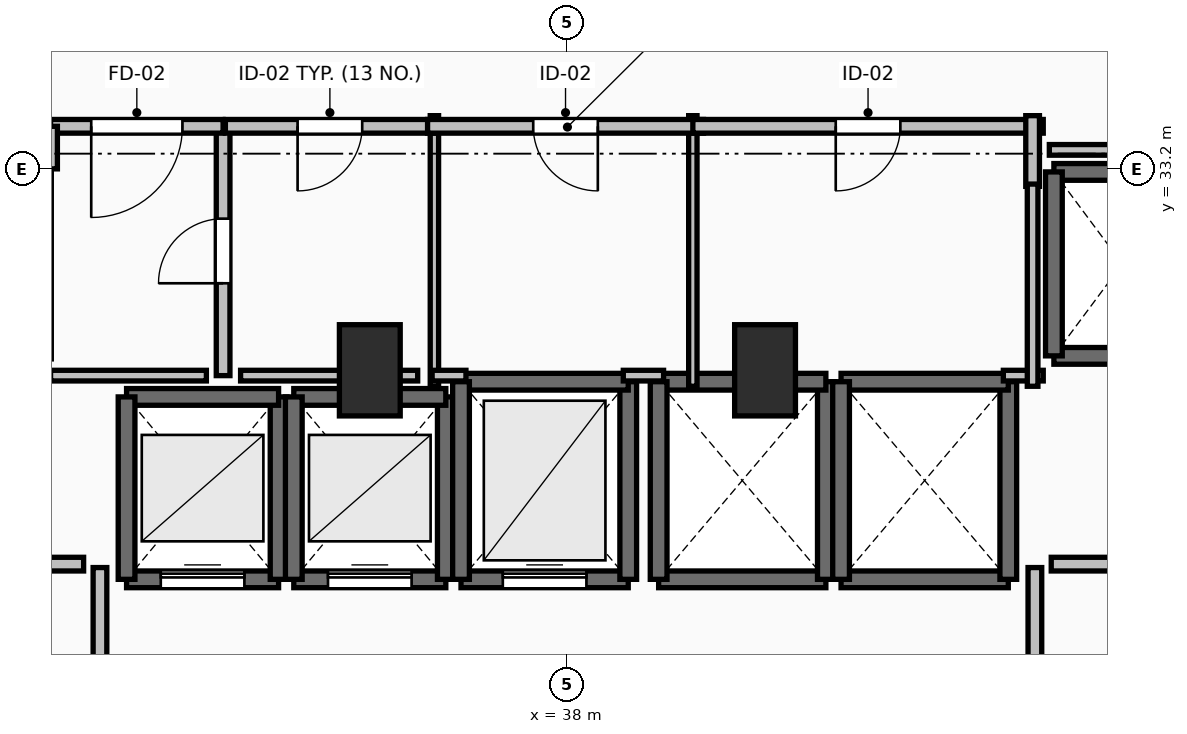
"""IFC4 building model, lengths in metres.
Left out: names, types, materials, properties, quantities, classifications, styles, units other than length and angle.
Written with IfcOpenShell. Run it as: python <this file> out.ifc"""

import sys

from ifc_helpers import new_model, si_unit, direction, frame, frame_2d, origin, origin_2d, place, context, subcontext, project, spatial, rectangle, extrude, element, fill, save


model = new_model("IFC4")
c1 = context("Model", 3, precision=1e-05, world=origin(), true_north=direction((0.0, 1.0)))
c2 = subcontext(c1, "Body", "Model", "MODEL_VIEW")
j1 = project(units=[si_unit("LENGTHUNIT", "METRE"), si_unit("PLANEANGLEUNIT", "RADIAN")], contexts=[c1])
p1 = place(None, origin())
s1 = spatial("IfcSite", under=j1, at=p1, CompositionType="ELEMENT")
p2 = place(p1, origin())
s2 = spatial("IfcBuilding", under=s1, at=p2, CompositionType="ELEMENT")
p3 = place(p2, frame((0.0, 0.0, 78.8)))
s3 = spatial("IfcBuildingStorey", under=s2, at=p3, CompositionType="ELEMENT", Elevation=78.8)
for number, where, z_axis, x_axis in (
    (1, (35.4, 30.55, 0.0), (0.0, 0.0, 1.0), (1.0, 0.0, 0.0)),
    (2, (40.6, 30.55, 0.0), (0.0, 0.0, 1.0), (1.0, 0.0, 0.0)),
):
    element("IfcColumn", number, at=place(p3, frame(where, z_axis=z_axis, x_axis=x_axis)), inside=s3, PredefinedType="PILASTER", context=c2, shape_type="SweptSolid", body=[
        extrude(rectangle(XDim=0.8, YDim=1.2, at=origin_2d()), origin(), (0.0, 0.0, 1.0), 3.5),
    ])
p4 = place(p3, frame((32.2, 27.8, 0.0), z_axis=(0.0, 0.0, 1.0), x_axis=(1.0, 0.0, 0.0)))
e3 = element("IfcWall", 3, at=p4, inside=s3, PredefinedType="SOLIDWALL", context=c2, shape_type="SweptSolid", body=[
    extrude(rectangle(XDim=2.0, YDim=0.22, at=frame_2d((1.0, 0.0))), origin(), (0.0, 0.0, 1.0), 3.24),
])
p5 = place(p4, frame((0.45, 0.0, 0.0)))
e4 = element("IfcOpeningElement", 4, at=p5, cuts=e3, PredefinedType="OPENING", context=c2, shape_type="SweptSolid", body=[
    extrude(rectangle(XDim=1.1, YDim=2.2, at=frame_2d((0.55, 1.1))), frame((0.0, 0.125, 0.0), z_axis=(0.0, -1.0, 0.0), x_axis=(1.0, 0.0, 0.0)), (0.0, 0.0, 1.0), 0.25),
])
p6 = place(p3, frame((34.2, 27.8, 0.0), z_axis=(0.0, 0.0, 1.0), x_axis=(0.0, 1.0, 0.0)))
e5 = element("IfcWall", 5, at=p6, inside=s3, PredefinedType="SOLIDWALL", context=c2, shape_type="SweptSolid", body=[
    extrude(rectangle(XDim=2.4, YDim=0.22, at=frame_2d((1.2, 0.0))), origin(), (0.0, 0.0, 1.0), 3.24),
])
p7 = place(p3, frame((34.2, 30.2, 0.0), z_axis=(0.0, 0.0, 1.0), x_axis=(-1.0, 0.0, 0.0)))
e6 = element("IfcWall", 6, at=p7, inside=s3, PredefinedType="SOLIDWALL", context=c2, shape_type="SweptSolid", body=[
    extrude(rectangle(XDim=2.0, YDim=0.22, at=frame_2d((1.0, 0.0))), origin(), (0.0, 0.0, 1.0), 3.24),
])
p8 = place(p3, frame((32.2, 30.2, 0.0), z_axis=(0.0, 0.0, 1.0), x_axis=(0.0, -1.0, 0.0)))
e7 = element("IfcWall", 7, at=p8, inside=s3, PredefinedType="SOLIDWALL", context=c2, shape_type="SweptSolid", body=[
    extrude(rectangle(XDim=2.4, YDim=0.22, at=frame_2d((1.2, 0.0))), origin(), (0.0, 0.0, 1.0), 3.24),
])
p9 = place(p3, frame((34.4, 27.8, 0.0), z_axis=(0.0, 0.0, 1.0), x_axis=(1.0, 0.0, 0.0)))
e8 = element("IfcWall", 8, at=p9, inside=s3, PredefinedType="SOLIDWALL", context=c2, shape_type="SweptSolid", body=[
    extrude(rectangle(XDim=2.0, YDim=0.22, at=frame_2d((1.0, 0.0))), origin(), (0.0, 0.0, 1.0), 3.24),
])
p10 = place(p9, frame((0.45, 0.0, 0.0)))
e9 = element("IfcOpeningElement", 9, at=p10, cuts=e8, PredefinedType="OPENING", context=c2, shape_type="SweptSolid", body=[
    extrude(rectangle(XDim=1.1, YDim=2.2, at=frame_2d((0.55, 1.1))), frame((0.0, 0.125, 0.0), z_axis=(0.0, -1.0, 0.0), x_axis=(1.0, 0.0, 0.0)), (0.0, 0.0, 1.0), 0.25),
])
p11 = place(p3, frame((36.4, 27.8, 0.0), z_axis=(0.0, 0.0, 1.0), x_axis=(0.0, 1.0, 0.0)))
e10 = element("IfcWall", 10, at=p11, inside=s3, PredefinedType="SOLIDWALL", context=c2, shape_type="SweptSolid", body=[
    extrude(rectangle(XDim=2.4, YDim=0.22, at=frame_2d((1.2, 0.0))), origin(), (0.0, 0.0, 1.0), 3.24),
])
p12 = place(p3, frame((36.4, 30.2, 0.0), z_axis=(0.0, 0.0, 1.0), x_axis=(-1.0, 0.0, 0.0)))
e11 = element("IfcWall", 11, at=p12, inside=s3, PredefinedType="SOLIDWALL", context=c2, shape_type="SweptSolid", body=[
    extrude(rectangle(XDim=2.0, YDim=0.22, at=frame_2d((1.0, 0.0))), origin(), (0.0, 0.0, 1.0), 3.24),
])
p13 = place(p3, frame((34.4, 30.2, 0.0), z_axis=(0.0, 0.0, 1.0), x_axis=(0.0, -1.0, 0.0)))
e12 = element("IfcWall", 12, at=p13, inside=s3, PredefinedType="SOLIDWALL", context=c2, shape_type="SweptSolid", body=[
    extrude(rectangle(XDim=2.4, YDim=0.22, at=frame_2d((1.2, 0.0))), origin(), (0.0, 0.0, 1.0), 3.24),
])
p14 = place(p3, frame((36.6, 27.8, 0.0), z_axis=(0.0, 0.0, 1.0), x_axis=(1.0, 0.0, 0.0)))
e13 = element("IfcWall", 13, at=p14, inside=s3, PredefinedType="SOLIDWALL", context=c2, shape_type="SweptSolid", body=[
    extrude(rectangle(XDim=2.2, YDim=0.22, at=frame_2d((1.1, 0.0))), origin(), (0.0, 0.0, 1.0), 3.24),
])
p15 = place(p14, frame((0.55, 0.0, 0.0)))
e14 = element("IfcOpeningElement", 14, at=p15, cuts=e13, PredefinedType="OPENING", context=c2, shape_type="SweptSolid", body=[
    extrude(rectangle(XDim=1.1, YDim=2.2, at=frame_2d((0.55, 1.1))), frame((0.0, 0.125, 0.0), z_axis=(0.0, -1.0, 0.0), x_axis=(1.0, 0.0, 0.0)), (0.0, 0.0, 1.0), 0.25),
])
p16 = place(p3, frame((38.8, 27.8, 0.0), z_axis=(0.0, 0.0, 1.0), x_axis=(0.0, 1.0, 0.0)))
e15 = element("IfcWall", 15, at=p16, inside=s3, PredefinedType="SOLIDWALL", context=c2, shape_type="SweptSolid", body=[
    extrude(rectangle(XDim=2.6, YDim=0.22, at=frame_2d((1.3, 0.0))), origin(), (0.0, 0.0, 1.0), 3.24),
])
p17 = place(p3, frame((38.8, 30.4, 0.0), z_axis=(0.0, 0.0, 1.0), x_axis=(-1.0, 0.0, 0.0)))
e16 = element("IfcWall", 16, at=p17, inside=s3, PredefinedType="SOLIDWALL", context=c2, shape_type="SweptSolid", body=[
    extrude(rectangle(XDim=2.2, YDim=0.22, at=frame_2d((1.1, 0.0))), origin(), (0.0, 0.0, 1.0), 3.24),
])
p18 = place(p3, frame((36.6, 30.4, 0.0), z_axis=(0.0, 0.0, 1.0), x_axis=(0.0, -1.0, 0.0)))
e17 = element("IfcWall", 17, at=p18, inside=s3, PredefinedType="SOLIDWALL", context=c2, shape_type="SweptSolid", body=[
    extrude(rectangle(XDim=2.6, YDim=0.22, at=frame_2d((1.3, 0.0))), origin(), (0.0, 0.0, 1.0), 3.24),
])
p19 = place(p3, frame((39.2, 27.8, 0.0), z_axis=(0.0, 0.0, 1.0), x_axis=(1.0, 0.0, 0.0)))
e18 = element("IfcWall", 18, at=p19, inside=s3, PredefinedType="SOLIDWALL", context=c2, shape_type="SweptSolid", body=[
    extrude(rectangle(XDim=2.2, YDim=0.22, at=frame_2d((1.1, 0.0))), origin(), (0.0, 0.0, 1.0), 3.24),
])
p20 = place(p3, frame((41.4, 27.8, 0.0), z_axis=(0.0, 0.0, 1.0), x_axis=(0.0, 1.0, 0.0)))
e19 = element("IfcWall", 19, at=p20, inside=s3, PredefinedType="SOLIDWALL", context=c2, shape_type="SweptSolid", body=[
    extrude(rectangle(XDim=2.6, YDim=0.22, at=frame_2d((1.3, 0.0))), origin(), (0.0, 0.0, 1.0), 3.24),
])
p21 = place(p3, frame((41.4, 30.4, 0.0), z_axis=(0.0, 0.0, 1.0), x_axis=(-1.0, 0.0, 0.0)))
e20 = element("IfcWall", 20, at=p21, inside=s3, PredefinedType="SOLIDWALL", context=c2, shape_type="SweptSolid", body=[
    extrude(rectangle(XDim=2.2, YDim=0.22, at=frame_2d((1.1, 0.0))), origin(), (0.0, 0.0, 1.0), 3.24),
])
p22 = place(p3, frame((39.2, 30.4, 0.0), z_axis=(0.0, 0.0, 1.0), x_axis=(0.0, -1.0, 0.0)))
e21 = element("IfcWall", 21, at=p22, inside=s3, PredefinedType="SOLIDWALL", context=c2, shape_type="SweptSolid", body=[
    extrude(rectangle(XDim=2.6, YDim=0.22, at=frame_2d((1.3, 0.0))), origin(), (0.0, 0.0, 1.0), 3.24),
])
p23 = place(p3, frame((41.6, 27.8, 0.0), z_axis=(0.0, 0.0, 1.0), x_axis=(1.0, 0.0, 0.0)))
e22 = element("IfcWall", 22, at=p23, inside=s3, PredefinedType="SOLIDWALL", context=c2, shape_type="SweptSolid", body=[
    extrude(rectangle(XDim=2.2, YDim=0.22, at=frame_2d((1.1, 0.0))), origin(), (0.0, 0.0, 1.0), 3.24),
])
p24 = place(p3, frame((43.8, 27.8, 0.0), z_axis=(0.0, 0.0, 1.0), x_axis=(0.0, 1.0, 0.0)))
e23 = element("IfcWall", 23, at=p24, inside=s3, PredefinedType="SOLIDWALL", context=c2, shape_type="SweptSolid", body=[
    extrude(rectangle(XDim=2.6, YDim=0.22, at=frame_2d((1.3, 0.0))), origin(), (0.0, 0.0, 1.0), 3.24),
])
p25 = place(p3, frame((43.8, 30.4, 0.0), z_axis=(0.0, 0.0, 1.0), x_axis=(-1.0, 0.0, 0.0)))
e24 = element("IfcWall", 24, at=p25, inside=s3, PredefinedType="SOLIDWALL", context=c2, shape_type="SweptSolid", body=[
    extrude(rectangle(XDim=2.2, YDim=0.22, at=frame_2d((1.1, 0.0))), origin(), (0.0, 0.0, 1.0), 3.24),
])
p26 = place(p3, frame((41.6, 30.4, 0.0), z_axis=(0.0, 0.0, 1.0), x_axis=(0.0, -1.0, 0.0)))
e25 = element("IfcWall", 25, at=p26, inside=s3, PredefinedType="SOLIDWALL", context=c2, shape_type="SweptSolid", body=[
    extrude(rectangle(XDim=2.6, YDim=0.22, at=frame_2d((1.3, 0.0))), origin(), (0.0, 0.0, 1.0), 3.24),
])
for number, where, z_axis, x_axis in (
    (26, (44.4, 30.74, 0.0), (0.0, 0.0, 1.0), (1.0, 0.0, 0.0)),
    (27, (46.2, 33.16, 0.0), (0.0, 0.0, 1.0), (-1.0, 0.0, 0.0)),
):
    element("IfcWall", number, at=place(p3, frame(where, z_axis=z_axis, x_axis=x_axis)), inside=s3, PredefinedType="SOLIDWALL", context=c2, shape_type="SweptSolid", body=[
        extrude(rectangle(XDim=1.8, YDim=0.22, at=frame_2d((0.9, 0.0))), origin(), (0.0, 0.0, 1.0), 3.24),
    ])
p27 = place(p3, frame((44.4, 33.16, 0.0), z_axis=(0.0, 0.0, 1.0), x_axis=(0.0, -1.0, 0.0)))
e28 = element("IfcWall", 28, at=p27, inside=s3, PredefinedType="SOLIDWALL", context=c2, shape_type="SweptSolid", body=[
    extrude(rectangle(XDim=2.42, YDim=0.22, at=frame_2d((1.21, 0.0))), origin(), (0.0, 0.0, 1.0), 3.24),
])
p28 = place(p3, frame((31.85, 24.045, 0.0), z_axis=(0.0, 0.0, 1.0), x_axis=(0.0, 1.0, 0.0)))
e29 = element("IfcWall", 29, at=p28, inside=s3, PredefinedType="PARTITIONING", context=c2, shape_type="SweptSolid", body=[
    extrude(rectangle(XDim=3.91, YDim=0.18, at=frame_2d((1.955, 0.0))), origin(), (0.0, 0.0, 1.0), 3.24),
])
p29 = place(p28, frame((1.355, 0.0, 0.0)))
e30 = element("IfcOpeningElement", 30, at=p29, cuts=e29, PredefinedType="OPENING", context=c2, shape_type="SweptSolid", body=[
    extrude(rectangle(XDim=1.2, YDim=2.15, at=frame_2d((0.6, 1.075))), frame((0.0, 0.105, 0.0), z_axis=(0.0, -1.0, 0.0), x_axis=(1.0, 0.0, 0.0)), (0.0, 0.0, 1.0), 0.21),
])
p30 = place(p3, frame((44.15, 27.955, 0.0), z_axis=(0.0, 0.0, 1.0), x_axis=(0.0, -1.0, 0.0)))
e31 = element("IfcWall", 31, at=p30, inside=s3, PredefinedType="PARTITIONING", context=c2, shape_type="SweptSolid", body=[
    extrude(rectangle(XDim=3.91, YDim=0.18, at=frame_2d((1.955, 0.0))), origin(), (0.0, 0.0, 1.0), 3.24),
])
p31 = place(p30, frame((1.355, 0.0, 0.0)))
e32 = element("IfcOpeningElement", 32, at=p31, cuts=e31, PredefinedType="OPENING", context=c2, shape_type="SweptSolid", body=[
    extrude(rectangle(XDim=1.2, YDim=2.15, at=frame_2d((0.6, 1.075))), frame((0.0, 0.105, 0.0), z_axis=(0.0, -1.0, 0.0), x_axis=(1.0, 0.0, 0.0)), (0.0, 0.0, 1.0), 0.21),
])
p32 = place(p3, frame((33.47, 30.48, 0.0), z_axis=(0.0, 0.0, 1.0), x_axis=(0.0, 1.0, 0.0)))
e33 = element("IfcWall", 33, at=p32, inside=s3, PredefinedType="PARTITIONING", context=c2, shape_type="SweptSolid", body=[
    extrude(rectangle(XDim=3.28, YDim=0.18, at=frame_2d((1.64, 0.0))), origin(), (0.0, 0.0, 1.0), 3.24),
])
p33 = place(p32, frame((1.215, 0.0, 0.0)))
e34 = element("IfcOpeningElement", 34, at=p33, cuts=e33, PredefinedType="OPENING", context=c2, shape_type="SweptSolid", body=[
    extrude(rectangle(XDim=0.85, YDim=2.1, at=frame_2d((0.425, 1.05))), frame((0.0, 0.105, 0.0), z_axis=(0.0, -1.0, 0.0), x_axis=(1.0, 0.0, 0.0)), (0.0, 0.0, 1.0), 0.21),
])
p34 = place(p3, frame((33.47, 33.76, 0.0), z_axis=(0.0, 0.0, 1.0), x_axis=(-1.0, 0.0, 0.0)))
e35 = element("IfcWall", 35, at=p34, inside=s3, PredefinedType="PARTITIONING", context=c2, shape_type="SweptSolid", body=[
    extrude(rectangle(XDim=2.27, YDim=0.18, at=frame_2d((1.135, 0.0))), origin(), (0.0, 0.0, 1.0), 3.24),
])
p35 = place(p34, frame((0.535, 0.0, 0.0)))
e36 = element("IfcOpeningElement", 36, at=p35, cuts=e35, PredefinedType="OPENING", context=c2, shape_type="SweptSolid", body=[
    extrude(rectangle(XDim=1.2, YDim=2.15, at=frame_2d((0.6, 1.075))), frame((0.0, 0.105, 0.0), z_axis=(0.0, -1.0, 0.0), x_axis=(1.0, 0.0, 0.0)), (0.0, 0.0, 1.0), 0.21),
])
p36 = place(p3, frame((31.2, 33.76, 0.0), z_axis=(0.0, 0.0, 1.0), x_axis=(0.0, -1.0, 0.0)))
e37 = element("IfcWall", 37, at=p36, inside=s3, PredefinedType="PARTITIONING", context=c2, shape_type="SweptSolid", body=[
    extrude(rectangle(XDim=0.56, YDim=0.18, at=frame_2d((0.28, 0.0))), origin(), (0.0, 0.0, 1.0), 3.24),
])
p37 = place(p3, frame((36.25, 30.34, 0.0), z_axis=(0.0, 0.0, 1.0), x_axis=(0.0, 1.0, 0.0)))
e38 = element("IfcWall", 38, at=p37, inside=s3, PredefinedType="PARTITIONING", context=c2, shape_type="SweptSolid", body=[
    extrude(rectangle(XDim=3.56, YDim=0.11, at=frame_2d((1.78, 0.0))), origin(), (0.0, 0.0, 1.0), 2.432),
])
p38 = place(p3, frame((36.25, 33.76, 0.0), z_axis=(0.0, 0.0, 1.0), x_axis=(-1.0, 0.0, 0.0)))
e39 = element("IfcWall", 39, at=p38, inside=s3, PredefinedType="PARTITIONING", context=c2, shape_type="SweptSolid", body=[
    extrude(rectangle(XDim=2.75, YDim=0.18, at=frame_2d((1.375, 0.0))), origin(), (0.0, 0.0, 1.0), 3.24),
])
p39 = place(p38, frame((0.95, 0.0, 0.0)))
e40 = element("IfcOpeningElement", 40, at=p39, cuts=e39, PredefinedType="OPENING", context=c2, shape_type="SweptSolid", body=[
    extrude(rectangle(XDim=0.85, YDim=2.1, at=frame_2d((0.425, 1.05))), frame((0.0, 0.105, 0.0), z_axis=(0.0, -1.0, 0.0), x_axis=(1.0, 0.0, 0.0)), (0.0, 0.0, 1.0), 0.21),
])
p40 = place(p3, frame((39.65, 30.34, 0.0), z_axis=(0.0, 0.0, 1.0), x_axis=(0.0, 1.0, 0.0)))
e41 = element("IfcWall", 41, at=p40, inside=s3, PredefinedType="PARTITIONING", context=c2, shape_type="SweptSolid", body=[
    extrude(rectangle(XDim=3.56, YDim=0.11, at=frame_2d((1.78, 0.0))), origin(), (0.0, 0.0, 1.0), 2.432),
])
p41 = place(p3, frame((39.79, 33.76, 0.0), z_axis=(0.0, 0.0, 1.0), x_axis=(-1.0, 0.0, 0.0)))
e42 = element("IfcWall", 42, at=p41, inside=s3, PredefinedType="PARTITIONING", context=c2, shape_type="SweptSolid", body=[
    extrude(rectangle(XDim=3.63, YDim=0.18, at=frame_2d((1.815, 0.0))), origin(), (0.0, 0.0, 1.0), 3.24),
])
p42 = place(p41, frame((1.39, 0.0, 0.0)))
e43 = element("IfcOpeningElement", 43, at=p42, cuts=e42, PredefinedType="OPENING", context=c2, shape_type="SweptSolid", body=[
    extrude(rectangle(XDim=0.85, YDim=2.1, at=frame_2d((0.425, 1.05))), frame((0.0, 0.105, 0.0), z_axis=(0.0, -1.0, 0.0), x_axis=(1.0, 0.0, 0.0)), (0.0, 0.0, 1.0), 0.21),
])
p43 = place(p3, frame((44.26, 33.76, 0.0), z_axis=(0.0, 0.0, 1.0), x_axis=(-1.0, 0.0, 0.0)))
e44 = element("IfcWall", 44, at=p43, inside=s3, PredefinedType="PARTITIONING", context=c2, shape_type="SweptSolid", body=[
    extrude(rectangle(XDim=4.61, YDim=0.18, at=frame_2d((2.305, 0.0))), origin(), (0.0, 0.0, 1.0), 3.24),
])
p44 = place(p43, frame((1.88, 0.0, 0.0)))
e45 = element("IfcOpeningElement", 45, at=p44, cuts=e44, PredefinedType="OPENING", context=c2, shape_type="SweptSolid", body=[
    extrude(rectangle(XDim=0.85, YDim=2.1, at=frame_2d((0.425, 1.05))), frame((0.0, 0.105, 0.0), z_axis=(0.0, -1.0, 0.0), x_axis=(1.0, 0.0, 0.0)), (0.0, 0.0, 1.0), 0.21),
])
p45 = place(p3, frame((44.12, 32.97, 0.0), z_axis=(0.0, 0.0, 1.0), x_axis=(0.0, 1.0, 0.0)))
e46 = element("IfcWall", 46, at=p45, inside=s3, PredefinedType="PARTITIONING", context=c2, shape_type="SweptSolid", body=[
    extrude(rectangle(XDim=0.93, YDim=0.18, at=frame_2d((0.465, 0.0))), origin(), (0.0, 0.0, 1.0), 3.24),
])
for number, where, z_axis, x_axis in (
    (47, (31.635, 28.0, 0.0), (0.0, 0.0, 1.0), (-1.0, 0.0, 0.0)),
    (48, (45.28, 28.0, 0.0), (0.0, 0.0, 1.0), (-1.0, 0.0, 0.0)),
):
    element("IfcWall", number, at=place(p3, frame(where, z_axis=z_axis, x_axis=x_axis)), inside=s3, PredefinedType="PARTITIONING", context=c2, shape_type="SweptSolid", body=[
        extrude(rectangle(XDim=0.915, YDim=0.18, at=frame_2d((0.458, 0.0))), origin(), (0.0, 0.0, 1.0), 3.24),
    ])
p46 = place(p3, frame((31.2, 30.48, 0.0), z_axis=(0.0, 0.0, 1.0), x_axis=(1.0, 0.0, 0.0)))
e49 = element("IfcWall", 49, at=p46, inside=s3, PredefinedType="PARTITIONING", context=c2, shape_type="SweptSolid", body=[
    extrude(rectangle(XDim=2.05, YDim=0.14, at=frame_2d((1.025, 0.0))), origin(), (0.0, 0.0, 1.0), 3.24),
])
p47 = place(p3, frame((33.7, 30.48, 0.0), z_axis=(0.0, 0.0, 1.0), x_axis=(1.0, 0.0, 0.0)))
e50 = element("IfcWall", 50, at=p47, inside=s3, PredefinedType="PARTITIONING", context=c2, shape_type="SweptSolid", body=[
    extrude(rectangle(XDim=2.33, YDim=0.14, at=frame_2d((1.165, 0.0))), origin(), (0.0, 0.0, 1.0), 2.432),
])
p48 = place(p3, frame((36.22, 30.48, 0.0), z_axis=(0.0, 0.0, 1.0), x_axis=(1.0, 0.0, 0.0)))
e51 = element("IfcWall", 51, at=p48, inside=s3, PredefinedType="PARTITIONING", context=c2, shape_type="SweptSolid", body=[
    extrude(rectangle(XDim=0.445, YDim=0.14, at=frame_2d((0.223, 0.0))), origin(), (0.0, 0.0, 1.0), 2.432),
])
p49 = place(p3, frame((38.735, 30.48, 0.0), z_axis=(0.0, 0.0, 1.0), x_axis=(1.0, 0.0, 0.0)))
e52 = element("IfcWall", 52, at=p49, inside=s3, PredefinedType="PARTITIONING", context=c2, shape_type="SweptSolid", body=[
    extrude(rectangle(XDim=0.53, YDim=0.14, at=frame_2d((0.265, 0.0))), origin(), (0.0, 0.0, 1.0), 2.432),
])
p50 = place(p3, frame((43.735, 30.48, 0.0), z_axis=(0.0, 0.0, 1.0), x_axis=(1.0, 0.0, 0.0)))
e53 = element("IfcWall", 53, at=p50, inside=s3, PredefinedType="PARTITIONING", context=c2, shape_type="SweptSolid", body=[
    extrude(rectangle(XDim=0.525, YDim=0.14, at=frame_2d((0.262, 0.0))), origin(), (0.0, 0.0, 1.0), 3.24),
])
p51 = place(p3, frame((44.12, 30.34, 0.0), z_axis=(0.0, 0.0, 1.0), x_axis=(0.0, 1.0, 0.0)))
e54 = element("IfcWall", 54, at=p51, inside=s3, PredefinedType="PARTITIONING", context=c2, shape_type="SweptSolid", body=[
    extrude(rectangle(XDim=2.66, YDim=0.14, at=frame_2d((1.33, 0.0))), origin(), (0.0, 0.0, 1.0), 3.24),
])
p52 = place(p3, frame((44.34, 33.45, 0.0), z_axis=(0.0, 0.0, 1.0), x_axis=(1.0, 0.0, 0.0)))
e55 = element("IfcWall", 55, at=p52, inside=s3, PredefinedType="PARTITIONING", context=c2, shape_type="SweptSolid", body=[
    extrude(rectangle(XDim=4.21, YDim=0.14, at=frame_2d((2.105, 0.0))), origin(), (0.0, 0.0, 1.0), 2.432),
])
p53 = place(p5, origin())
e56 = element("IfcDoor", 56, at=p53, inside=s3, OperationType="SLIDING_TO_LEFT", PredefinedType="DOOR", context=c2, shape_type="SweptSolid", body=[
    extrude(rectangle(XDim=1.1, YDim=2.2, at=frame_2d((0.55, 1.1))), frame((0.0, 0.025, 0.0), z_axis=(0.0, -1.0, 0.0), x_axis=(1.0, 0.0, 0.0)), (0.0, 0.0, 1.0), 0.05),
])
fill(e4, e56)
p54 = place(p10, origin())
e57 = element("IfcDoor", 57, at=p54, inside=s3, OperationType="SLIDING_TO_LEFT", PredefinedType="DOOR", context=c2, shape_type="SweptSolid", body=[
    extrude(rectangle(XDim=1.1, YDim=2.2, at=frame_2d((0.55, 1.1))), frame((0.0, 0.025, 0.0), z_axis=(0.0, -1.0, 0.0), x_axis=(1.0, 0.0, 0.0)), (0.0, 0.0, 1.0), 0.05),
])
fill(e9, e57)
p55 = place(p15, origin())
e58 = element("IfcDoor", 58, at=p55, inside=s3, OperationType="SLIDING_TO_LEFT", PredefinedType="DOOR", context=c2, shape_type="SweptSolid", body=[
    extrude(rectangle(XDim=1.1, YDim=2.2, at=frame_2d((0.55, 1.1))), frame((0.0, 0.025, 0.0), z_axis=(0.0, -1.0, 0.0), x_axis=(1.0, 0.0, 0.0)), (0.0, 0.0, 1.0), 0.05),
])
fill(e14, e58)
p56 = place(p33, origin())
e59 = element("IfcDoor", 59, at=p56, inside=s3, OperationType="SINGLE_SWING_LEFT", PredefinedType="DOOR", context=c2, shape_type="SweptSolid", body=[
    extrude(rectangle(XDim=0.85, YDim=2.1, at=frame_2d((0.425, 1.05))), frame((0.0, 0.025, 0.0), z_axis=(0.0, -1.0, 0.0), x_axis=(1.0, 0.0, 0.0)), (0.0, 0.0, 1.0), 0.05),
])
fill(e34, e59)
p57 = place(p35, origin())
e60 = element("IfcDoor", 60, at=p57, inside=s3, OperationType="SINGLE_SWING_RIGHT", PredefinedType="DOOR", context=c2, shape_type="SweptSolid", body=[
    extrude(rectangle(XDim=1.2, YDim=2.15, at=frame_2d((0.6, 1.075))), frame((0.0, 0.025, 0.0), z_axis=(0.0, -1.0, 0.0), x_axis=(1.0, 0.0, 0.0)), (0.0, 0.0, 1.0), 0.05),
])
fill(e36, e60)
p58 = place(p39, origin())
e61 = element("IfcDoor", 61, at=p58, inside=s3, OperationType="SINGLE_SWING_RIGHT", PredefinedType="DOOR", context=c2, shape_type="SweptSolid", body=[
    extrude(rectangle(XDim=0.85, YDim=2.1, at=frame_2d((0.425, 1.05))), frame((0.0, 0.025, 0.0), z_axis=(0.0, -1.0, 0.0), x_axis=(1.0, 0.0, 0.0)), (0.0, 0.0, 1.0), 0.05),
])
fill(e40, e61)
p59 = place(p42, origin())
e62 = element("IfcDoor", 62, at=p59, inside=s3, OperationType="SINGLE_SWING_LEFT", PredefinedType="DOOR", context=c2, shape_type="SweptSolid", body=[
    extrude(rectangle(XDim=0.85, YDim=2.1, at=frame_2d((0.425, 1.05))), frame((0.0, 0.025, 0.0), z_axis=(0.0, -1.0, 0.0), x_axis=(1.0, 0.0, 0.0)), (0.0, 0.0, 1.0), 0.05),
])
fill(e43, e62)
p60 = place(p44, origin())
e63 = element("IfcDoor", 63, at=p60, inside=s3, OperationType="SINGLE_SWING_RIGHT", PredefinedType="DOOR", context=c2, shape_type="SweptSolid", body=[
    extrude(rectangle(XDim=0.85, YDim=2.1, at=frame_2d((0.425, 1.05))), frame((0.0, 0.025, 0.0), z_axis=(0.0, -1.0, 0.0), x_axis=(1.0, 0.0, 0.0)), (0.0, 0.0, 1.0), 0.05),
])
fill(e45, e63)
save(model, sys.argv[1])
